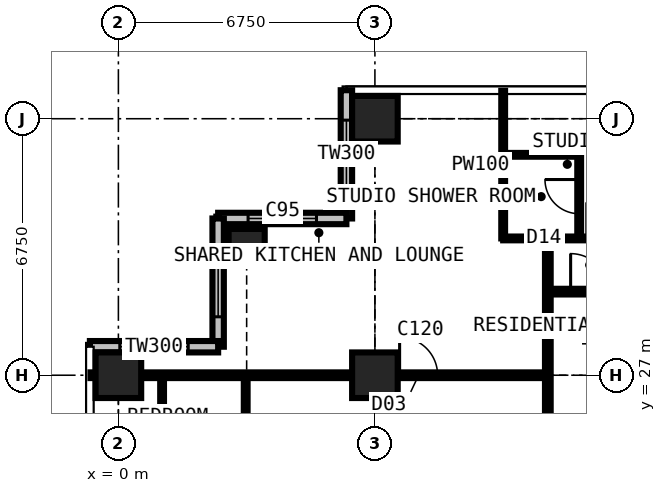
"""IFC4 building model, lengths in metres.
Left out: names, types, materials, properties, quantities, classifications, styles, units other than length and angle.
Written with IfcOpenShell. Run it as: python <this file> out.ifc"""

import sys

from ifc_helpers import new_model, si_unit, direction, frame, frame_2d, origin, origin_2d, place, context, subcontext, project, spatial, rectangle, extrude, element, fill, save


model = new_model("IFC4")
c1 = context("Model", 3, precision=1e-05, world=origin(), true_north=direction((0.0, 1.0)))
c2 = subcontext(c1, "Body", "Model", "MODEL_VIEW")
j1 = project(units=[si_unit("LENGTHUNIT", "METRE"), si_unit("PLANEANGLEUNIT", "RADIAN")], contexts=[c1])
p1 = place(None, origin())
s1 = spatial("IfcSite", under=j1, at=p1, CompositionType="ELEMENT")
p2 = place(p1, origin())
s2 = spatial("IfcBuilding", under=s1, at=p2, CompositionType="ELEMENT")
p3 = place(p2, frame((0.0, 0.0, 181.8)))
s3 = spatial("IfcBuildingStorey", under=s2, at=p3, CompositionType="ELEMENT", Elevation=181.8)
p4 = place(p3, frame((0.0, 27.0, 0.0), z_axis=(0.0, 0.0, 1.0), x_axis=(1.0, 0.0, 0.0)))
e1 = element("IfcColumn", 1, at=p4, inside=s3, PredefinedType="COLUMN", context=c2, shape_type="SweptSolid", body=[
    extrude(rectangle(XDim=1.2, YDim=1.2, at=origin_2d()), origin(), (0.0, 0.0, 1.0), 3.6),
])
p5 = place(p3, frame((3.375, 30.375, 0.0), z_axis=(0.0, 0.0, 1.0), x_axis=(1.0, 0.0, 0.0)))
e2 = element("IfcColumn", 2, at=p5, inside=s3, PredefinedType="COLUMN", context=c2, shape_type="SweptSolid", body=[
    extrude(rectangle(XDim=0.95, YDim=0.95, at=origin_2d()), origin(), (0.0, 0.0, 1.0), 3.6),
])
for number, where, z_axis, x_axis in (
    (3, (6.75, 27.0, 0.0), (0.0, 0.0, 1.0), (1.0, 0.0, 0.0)),
    (4, (6.75, 33.75, 0.0), (0.0, 0.0, 1.0), (1.0, 0.0, 0.0)),
):
    element("IfcColumn", number, at=place(p3, frame(where, z_axis=z_axis, x_axis=x_axis)), inside=s3, PredefinedType="COLUMN", context=c2, shape_type="SweptSolid", body=[
        extrude(rectangle(XDim=1.2, YDim=1.2, at=origin_2d()), origin(), (0.0, 0.0, 1.0), 3.6),
    ])
p6 = place(p3, frame((6.0, 34.5, 0.0), z_axis=(0.0, 0.0, 1.0), x_axis=(0.0, -1.0, 0.0)))
e5 = element("IfcWall", 5, at=p6, inside=s3, PredefinedType="SOLIDWALL", context=c2, shape_type="SweptSolid", body=[
    extrude(rectangle(XDim=3.375, YDim=0.3, at=frame_2d((1.688, 0.0))), origin(), (0.0, 0.0, 1.0), 3.375),
])
p7 = place(p6, frame((0.788, 0.0, 0.6)))
e6 = element("IfcOpeningElement", 6, at=p7, cuts=e5, PredefinedType="OPENING", context=c2, shape_type="SweptSolid", body=[
    extrude(rectangle(XDim=1.8, YDim=2.1, at=frame_2d((0.9, 1.05))), frame((0.0, 0.16, 0.0), z_axis=(0.0, -1.0, 0.0), x_axis=(1.0, 0.0, 0.0)), (0.0, 0.0, 1.0), 0.32),
])
p8 = place(p3, frame((6.0, 31.125, 0.0), z_axis=(0.0, 0.0, 1.0), x_axis=(-1.0, 0.0, 0.0)))
e7 = element("IfcWall", 7, at=p8, inside=s3, PredefinedType="SOLIDWALL", context=c2, shape_type="SweptSolid", body=[
    extrude(rectangle(XDim=3.375, YDim=0.3, at=frame_2d((1.688, 0.0))), origin(), (0.0, 0.0, 1.0), 3.375),
])
p9 = place(p8, frame((0.788, 0.0, 0.6)))
e8 = element("IfcOpeningElement", 8, at=p9, cuts=e7, PredefinedType="OPENING", context=c2, shape_type="SweptSolid", body=[
    extrude(rectangle(XDim=1.8, YDim=2.1, at=frame_2d((0.9, 1.05))), frame((0.0, 0.16, 0.0), z_axis=(0.0, -1.0, 0.0), x_axis=(1.0, 0.0, 0.0)), (0.0, 0.0, 1.0), 0.32),
])
p10 = place(p3, frame((2.625, 31.125, 0.0), z_axis=(0.0, 0.0, 1.0), x_axis=(0.0, -1.0, 0.0)))
e9 = element("IfcWall", 9, at=p10, inside=s3, PredefinedType="SOLIDWALL", context=c2, shape_type="SweptSolid", body=[
    extrude(rectangle(XDim=3.375, YDim=0.3, at=frame_2d((1.688, 0.0))), origin(), (0.0, 0.0, 1.0), 3.375),
])
p11 = place(p10, frame((0.788, 0.0, 0.6)))
e10 = element("IfcOpeningElement", 10, at=p11, cuts=e9, PredefinedType="OPENING", context=c2, shape_type="SweptSolid", body=[
    extrude(rectangle(XDim=1.8, YDim=2.1, at=frame_2d((0.9, 1.05))), frame((0.0, 0.16, 0.0), z_axis=(0.0, -1.0, 0.0), x_axis=(1.0, 0.0, 0.0)), (0.0, 0.0, 1.0), 0.32),
])
p12 = place(p3, frame((2.625, 27.75, 0.0), z_axis=(0.0, 0.0, 1.0), x_axis=(-1.0, 0.0, 0.0)))
e11 = element("IfcWall", 11, at=p12, inside=s3, PredefinedType="SOLIDWALL", context=c2, shape_type="SweptSolid", body=[
    extrude(rectangle(XDim=3.375, YDim=0.3, at=frame_2d((1.688, 0.0))), origin(), (0.0, 0.0, 1.0), 3.375),
])
p13 = place(p12, frame((0.788, 0.0, 0.6)))
e12 = element("IfcOpeningElement", 12, at=p13, cuts=e11, PredefinedType="OPENING", context=c2, shape_type="SweptSolid", body=[
    extrude(rectangle(XDim=1.8, YDim=2.1, at=frame_2d((0.9, 1.05))), frame((0.0, 0.16, 0.0), z_axis=(0.0, -1.0, 0.0), x_axis=(1.0, 0.0, 0.0)), (0.0, 0.0, 1.0), 0.32),
])
p14 = place(p3, frame((-0.734, 27.0, 0.0), z_axis=(0.0, 0.0, 1.0), x_axis=(1.0, 0.0, 0.0)))
e13 = element("IfcWall", 13, at=p14, inside=s3, PredefinedType="PARTITIONING", context=c2, shape_type="SweptSolid", body=[
    extrude(rectangle(XDim=12.034, YDim=0.15, at=frame_2d((6.017, 0.0))), origin(), (0.0, 0.0, 1.0), 2.806),
])
p15 = place(p14, frame((8.134, 0.0, 0.0)))
e14 = element("IfcOpeningElement", 14, at=p15, cuts=e13, PredefinedType="OPENING", context=c2, shape_type="SweptSolid", body=[
    extrude(rectangle(XDim=1.0, YDim=2.2, at=frame_2d((0.5, 1.1))), frame((0.0, 0.085, 0.0), z_axis=(0.0, -1.0, 0.0), x_axis=(1.0, 0.0, 0.0)), (0.0, 0.0, 1.0), 0.17),
])
p16 = place(p3, frame((1.15, 25.0, 0.0), z_axis=(0.0, 0.0, 1.0), x_axis=(0.0, 1.0, 0.0)))
e15 = element("IfcWall", 15, at=p16, inside=s3, PredefinedType="PARTITIONING", context=c2, shape_type="SweptSolid", body=[
    extrude(rectangle(XDim=2.0, YDim=0.1, at=frame_2d((1.0, 0.0))), origin(), (0.0, 0.0, 1.0), 3.375),
])
p17 = place(p3, frame((3.35, 10.125, 0.0), z_axis=(0.0, 0.0, 1.0), x_axis=(0.0, 1.0, 0.0)))
e16 = element("IfcWall", 16, at=p17, inside=s3, PredefinedType="PARTITIONING", context=c2, shape_type="SweptSolid", body=[
    extrude(rectangle(XDim=16.875, YDim=0.1, at=frame_2d((8.438, 0.0))), origin(), (0.0, 0.0, 1.0), 3.375),
])
p18 = place(p17, frame((13.7, 0.0, 0.0)))
e17 = element("IfcOpeningElement", 17, at=p18, cuts=e16, PredefinedType="OPENING", context=c2, shape_type="SweptSolid", body=[
    extrude(rectangle(XDim=0.95, YDim=2.2, at=frame_2d((0.475, 1.1))), frame((0.0, 0.06, 0.0), z_axis=(0.0, -1.0, 0.0), x_axis=(1.0, 0.0, 0.0)), (0.0, 0.0, 1.0), 0.12),
])
p19 = place(p17, frame((0.2, 0.0, 0.0)))
e18 = element("IfcOpeningElement", 18, at=p19, cuts=e16, PredefinedType="OPENING", context=c2, shape_type="SweptSolid", body=[
    extrude(rectangle(XDim=0.95, YDim=2.2, at=frame_2d((0.475, 1.1))), frame((0.0, 0.06, 0.0), z_axis=(0.0, -1.0, 0.0), x_axis=(1.0, 0.0, 0.0)), (0.0, 0.0, 1.0), 0.12),
])
p20 = place(p17, frame((3.575, 0.0, 0.0)))
e19 = element("IfcOpeningElement", 19, at=p20, cuts=e16, PredefinedType="OPENING", context=c2, shape_type="SweptSolid", body=[
    extrude(rectangle(XDim=0.95, YDim=2.2, at=frame_2d((0.475, 1.1))), frame((0.0, 0.06, 0.0), z_axis=(0.0, -1.0, 0.0), x_axis=(1.0, 0.0, 0.0)), (0.0, 0.0, 1.0), 0.12),
])
p21 = place(p17, frame((6.95, 0.0, 0.0)))
e20 = element("IfcOpeningElement", 20, at=p21, cuts=e16, PredefinedType="OPENING", context=c2, shape_type="SweptSolid", body=[
    extrude(rectangle(XDim=0.95, YDim=2.2, at=frame_2d((0.475, 1.1))), frame((0.0, 0.06, 0.0), z_axis=(0.0, -1.0, 0.0), x_axis=(1.0, 0.0, 0.0)), (0.0, 0.0, 1.0), 0.12),
])
p22 = place(p17, frame((10.325, 0.0, 0.0)))
e21 = element("IfcOpeningElement", 21, at=p22, cuts=e16, PredefinedType="OPENING", context=c2, shape_type="SweptSolid", body=[
    extrude(rectangle(XDim=0.95, YDim=2.2, at=frame_2d((0.475, 1.1))), frame((0.0, 0.06, 0.0), z_axis=(0.0, -1.0, 0.0), x_axis=(1.0, 0.0, 0.0)), (0.0, 0.0, 1.0), 0.12),
])
p23 = place(p3, frame((10.125, 30.6, 0.0), z_axis=(0.0, 0.0, 1.0), x_axis=(0.0, 1.0, 0.0)))
e22 = element("IfcWall", 22, at=p23, inside=s3, PredefinedType="PARTITIONING", context=c2, shape_type="SweptSolid", body=[
    extrude(rectangle(XDim=3.884, YDim=0.1, at=frame_2d((1.942, 0.0))), origin(), (0.0, 0.0, 1.0), 3.375),
])
p24 = place(p3, frame((10.125, 30.6, 0.0), z_axis=(0.0, 0.0, 1.0), x_axis=(1.0, 0.0, 0.0)))
e23 = element("IfcWall", 23, at=p24, inside=s3, PredefinedType="PARTITIONING", context=c2, shape_type="SweptSolid", body=[
    extrude(rectangle(XDim=3.375, YDim=0.1, at=frame_2d((1.688, 0.0))), origin(), (0.0, 0.0, 1.0), 3.375),
])
p25 = place(p24, frame((2.2, 0.0, 0.0)))
e24 = element("IfcOpeningElement", 24, at=p25, cuts=e23, PredefinedType="OPENING", context=c2, shape_type="SweptSolid", body=[
    extrude(rectangle(XDim=0.95, YDim=2.2, at=frame_2d((0.475, 1.1))), frame((0.0, 0.06, 0.0), z_axis=(0.0, -1.0, 0.0), x_axis=(1.0, 0.0, 0.0)), (0.0, 0.0, 1.0), 0.12),
])
p26 = place(p3, frame((10.125, 32.8, 0.0), z_axis=(0.0, 0.0, 1.0), x_axis=(1.0, 0.0, 0.0)))
e25 = element("IfcWall", 25, at=p26, inside=s3, PredefinedType="PARTITIONING", context=c2, shape_type="SweptSolid", body=[
    extrude(rectangle(XDim=2.0, YDim=0.1, at=frame_2d((1.0, 0.0))), origin(), (0.0, 0.0, 1.0), 3.375),
])
p27 = place(p3, frame((11.3, 11.3, 0.0), z_axis=(0.0, 0.0, 1.0), x_axis=(0.0, 1.0, 0.0)))
e26 = element("IfcWall", 26, at=p27, inside=s3, PredefinedType="PARTITIONING", context=c2, shape_type="SweptSolid", body=[
    extrude(rectangle(XDim=19.3, YDim=0.15, at=frame_2d((9.65, 0.0))), origin(), (0.0, 0.0, 1.0), 3.375),
])
p28 = place(p27, frame((13.525, 0.0, 0.0)))
e27 = element("IfcOpeningElement", 27, at=p28, cuts=e26, PredefinedType="OPENING", context=c2, shape_type="SweptSolid", body=[
    extrude(rectangle(XDim=1.0, YDim=2.2, at=frame_2d((0.5, 1.1))), frame((0.0, 0.085, 0.0), z_axis=(0.0, -1.0, 0.0), x_axis=(1.0, 0.0, 0.0)), (0.0, 0.0, 1.0), 0.17),
])
p29 = place(p27, frame((10.438, 0.0, 0.0)))
e28 = element("IfcOpeningElement", 28, at=p29, cuts=e26, PredefinedType="OPENING", context=c2, shape_type="SweptSolid", body=[
    extrude(rectangle(XDim=1.0, YDim=2.2, at=frame_2d((0.5, 1.1))), frame((0.0, 0.085, 0.0), z_axis=(0.0, -1.0, 0.0), x_axis=(1.0, 0.0, 0.0)), (0.0, 0.0, 1.0), 0.17),
])
p30 = place(p3, frame((11.3, 29.2, 0.0), z_axis=(0.0, 0.0, 1.0), x_axis=(1.0, 0.0, 0.0)))
e29 = element("IfcWall", 29, at=p30, inside=s3, PredefinedType="PARTITIONING", context=c2, shape_type="SweptSolid", body=[
    extrude(rectangle(XDim=19.809, YDim=0.15, at=frame_2d((9.904, 0.0))), origin(), (0.0, 0.0, 1.0), 3.375),
])
p31 = place(p30, frame((14.625, 0.0, 0.0)))
e30 = element("IfcOpeningElement", 30, at=p31, cuts=e29, PredefinedType="OPENING", context=c2, shape_type="SweptSolid", body=[
    extrude(rectangle(XDim=1.0, YDim=2.2, at=frame_2d((0.5, 1.1))), frame((0.0, 0.085, 0.0), z_axis=(0.0, -1.0, 0.0), x_axis=(1.0, 0.0, 0.0)), (0.0, 0.0, 1.0), 0.17),
])
p32 = place(p30, frame((5.825, 0.0, 0.0)))
e31 = element("IfcOpeningElement", 31, at=p32, cuts=e29, PredefinedType="OPENING", context=c2, shape_type="SweptSolid", body=[
    extrude(rectangle(XDim=0.95, YDim=2.2, at=frame_2d((0.475, 1.1))), frame((0.0, 0.085, 0.0), z_axis=(0.0, -1.0, 0.0), x_axis=(1.0, 0.0, 0.0)), (0.0, 0.0, 1.0), 0.17),
])
p33 = place(p30, frame((9.2, 0.0, 0.0)))
e32 = element("IfcOpeningElement", 32, at=p33, cuts=e29, PredefinedType="OPENING", context=c2, shape_type="SweptSolid", body=[
    extrude(rectangle(XDim=0.95, YDim=2.2, at=frame_2d((0.475, 1.1))), frame((0.0, 0.085, 0.0), z_axis=(0.0, -1.0, 0.0), x_axis=(1.0, 0.0, 0.0)), (0.0, 0.0, 1.0), 0.17),
])
p34 = place(p30, frame((0.6, 0.0, 0.0)))
e33 = element("IfcOpeningElement", 33, at=p34, cuts=e29, PredefinedType="OPENING", context=c2, shape_type="SweptSolid", body=[
    extrude(rectangle(XDim=1.0, YDim=2.2, at=frame_2d((0.5, 1.1))), frame((0.0, 0.085, 0.0), z_axis=(0.0, -1.0, 0.0), x_axis=(1.0, 0.0, 0.0)), (0.0, 0.0, 1.0), 0.17),
])
p35 = place(p3, frame((12.125, 30.6, 0.0), z_axis=(0.0, 0.0, 1.0), x_axis=(0.0, 1.0, 0.0)))
e34 = element("IfcWall", 34, at=p35, inside=s3, PredefinedType="PARTITIONING", context=c2, shape_type="SweptSolid", body=[
    extrude(rectangle(XDim=2.2, YDim=0.1, at=frame_2d((1.1, 0.0))), origin(), (0.0, 0.0, 1.0), 3.375),
])
p36 = place(p35, frame((0.65, 0.0, 0.0)))
e35 = element("IfcOpeningElement", 35, at=p36, cuts=e34, PredefinedType="OPENING", context=c2, shape_type="SweptSolid", body=[
    extrude(rectangle(XDim=0.9, YDim=2.2, at=frame_2d((0.45, 1.1))), frame((0.0, 0.06, 0.0), z_axis=(0.0, -1.0, 0.0), x_axis=(1.0, 0.0, 0.0)), (0.0, 0.0, 1.0), 0.12),
])
p37 = place(p7, origin())
e36 = element("IfcWindow", 36, at=p37, inside=s3, PartitioningType="SINGLE_PANEL", PredefinedType="WINDOW", context=c2, shape_type="SweptSolid", body=[
    extrude(rectangle(XDim=1.8, YDim=2.1, at=frame_2d((0.9, 1.05))), frame((0.0, 0.03, 0.0), z_axis=(0.0, -1.0, 0.0), x_axis=(1.0, 0.0, 0.0)), (0.0, 0.0, 1.0), 0.06),
])
fill(e6, e36)
p38 = place(p9, origin())
e37 = element("IfcWindow", 37, at=p38, inside=s3, PartitioningType="SINGLE_PANEL", PredefinedType="WINDOW", context=c2, shape_type="SweptSolid", body=[
    extrude(rectangle(XDim=1.8, YDim=2.1, at=frame_2d((0.9, 1.05))), frame((0.0, 0.03, 0.0), z_axis=(0.0, -1.0, 0.0), x_axis=(1.0, 0.0, 0.0)), (0.0, 0.0, 1.0), 0.06),
])
fill(e8, e37)
p39 = place(p11, origin())
e38 = element("IfcWindow", 38, at=p39, inside=s3, PartitioningType="SINGLE_PANEL", PredefinedType="WINDOW", context=c2, shape_type="SweptSolid", body=[
    extrude(rectangle(XDim=1.8, YDim=2.1, at=frame_2d((0.9, 1.05))), frame((0.0, 0.03, 0.0), z_axis=(0.0, -1.0, 0.0), x_axis=(1.0, 0.0, 0.0)), (0.0, 0.0, 1.0), 0.06),
])
fill(e10, e38)
p40 = place(p13, origin())
e39 = element("IfcWindow", 39, at=p40, inside=s3, PartitioningType="SINGLE_PANEL", PredefinedType="WINDOW", context=c2, shape_type="SweptSolid", body=[
    extrude(rectangle(XDim=1.8, YDim=2.1, at=frame_2d((0.9, 1.05))), frame((0.0, 0.03, 0.0), z_axis=(0.0, -1.0, 0.0), x_axis=(1.0, 0.0, 0.0)), (0.0, 0.0, 1.0), 0.06),
])
fill(e12, e39)
p41 = place(p36, origin())
e40 = element("IfcDoor", 40, at=p41, inside=s3, OperationType="SINGLE_SWING_RIGHT", PredefinedType="DOOR", context=c2, shape_type="SweptSolid", body=[
    extrude(rectangle(XDim=0.9, YDim=2.2, at=frame_2d((0.45, 1.1))), frame((0.0, 0.025, 0.0), z_axis=(0.0, -1.0, 0.0), x_axis=(1.0, 0.0, 0.0)), (0.0, 0.0, 1.0), 0.05),
])
fill(e35, e40)
p42 = place(p34, origin())
e41 = element("IfcDoor", 41, at=p42, inside=s3, OperationType="SINGLE_SWING_LEFT", PredefinedType="DOOR", context=c2, shape_type="SweptSolid", body=[
    extrude(rectangle(XDim=1.0, YDim=2.2, at=frame_2d((0.5, 1.1))), frame((0.0, 0.025, 0.0), z_axis=(0.0, -1.0, 0.0), x_axis=(1.0, 0.0, 0.0)), (0.0, 0.0, 1.0), 0.05),
])
fill(e33, e41)
p43 = place(p15, origin())
e42 = element("IfcDoor", 42, at=p43, inside=s3, OperationType="SINGLE_SWING_LEFT", PredefinedType="DOOR", context=c2, shape_type="SweptSolid", body=[
    extrude(rectangle(XDim=1.0, YDim=2.2, at=frame_2d((0.5, 1.1))), frame((0.0, 0.025, 0.0), z_axis=(0.0, -1.0, 0.0), x_axis=(1.0, 0.0, 0.0)), (0.0, 0.0, 1.0), 0.05),
])
fill(e14, e42)
save(model, sys.argv[1])
